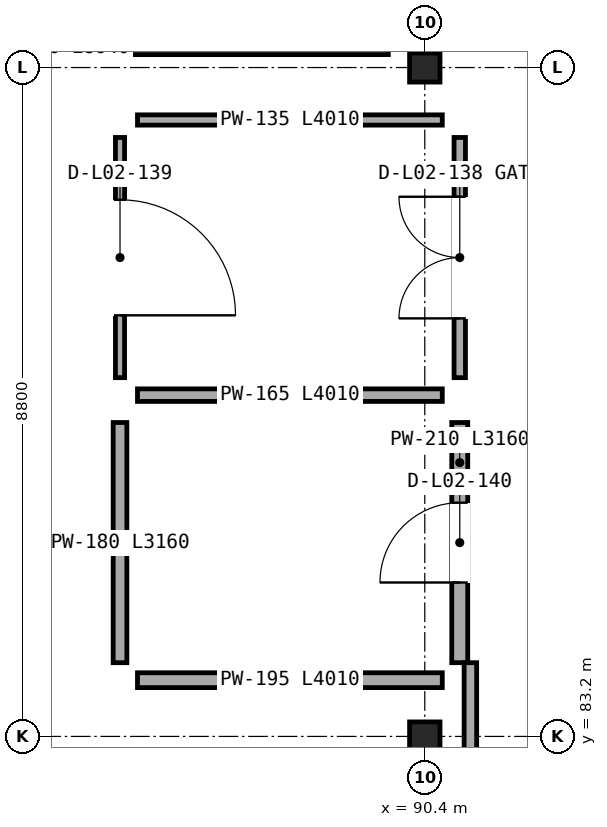
"""IFC4 building model, lengths in metres.
Left out: names, types, materials, properties, quantities, classifications, styles, units other than length and angle.
Written with IfcOpenShell. Run it as: python <this file> out.ifc"""

import sys

from ifc_helpers import new_model, si_unit, direction, frame, frame_2d, origin, origin_2d, place, context, subcontext, project, spatial, rectangle, i_section, extrude, element, fill, save


model = new_model("IFC4")
c1 = context("Model", 3, precision=1e-05, world=origin(), true_north=direction((0.0, 1.0)))
c2 = subcontext(c1, "Body", "Model", "MODEL_VIEW")
j1 = project(units=[si_unit("LENGTHUNIT", "METRE"), si_unit("PLANEANGLEUNIT", "RADIAN")], contexts=[c1])
p1 = place(None, origin())
s1 = spatial("IfcSite", under=j1, at=p1, CompositionType="ELEMENT")
p2 = place(p1, origin())
s2 = spatial("IfcBuilding", under=s1, at=p2, CompositionType="ELEMENT")
p3 = place(p2, frame((0.0, 0.0, 10.1)))
s3 = spatial("IfcBuildingStorey", under=s2, at=p3, CompositionType="ELEMENT", Elevation=10.1)
for number, where, z_axis, x_axis in (
    (1, (90.4, 83.2, 0.0), (0.0, 0.0, 1.0), (1.0, 0.0, 0.0)),
    (2, (90.4, 92.0, 0.0), (0.0, 0.0, 1.0), (1.0, 0.0, 0.0)),
):
    element("IfcColumn", number, at=place(p3, frame(where, z_axis=z_axis, x_axis=x_axis)), inside=s3, PredefinedType="COLUMN", context=c2, shape_type="SweptSolid", body=[
        extrude(i_section(OverallWidth=0.4, OverallDepth=0.382, WebThickness=0.025, FlangeThickness=0.036, at=origin_2d()), origin(), (0.0, 0.0, 1.0), 4.5),
    ])
p4 = place(p3, frame((90.63, 87.69, 0.0), z_axis=(0.0, 0.0, 1.0), x_axis=(-1.0, 0.0, 0.0)))
e3 = element("IfcWall", 3, at=p4, inside=s3, PredefinedType="PARTITIONING", context=c2, shape_type="SweptSolid", body=[
    extrude(rectangle(XDim=4.01, YDim=0.165, at=frame_2d((2.005, 0.0))), origin(), (0.0, 0.0, 1.0), 3.763),
])
p5 = place(p3, frame((90.86, 91.08, 0.0), z_axis=(0.0, 0.0, 1.0), x_axis=(0.0, -1.0, 0.0)))
e4 = element("IfcWall", 4, at=p5, inside=s3, PredefinedType="PARTITIONING", context=c2, shape_type="SweptSolid", body=[
    extrude(rectangle(XDim=3.16, YDim=0.15, at=frame_2d((1.58, 0.0))), origin(), (0.0, 0.0, 1.0), 4.13),
])
p6 = place(p5, frame((0.78, 0.0, 0.0)))
e5 = element("IfcOpeningElement", 5, at=p6, cuts=e4, PredefinedType="OPENING", context=c2, shape_type="SweptSolid", body=[
    extrude(rectangle(XDim=1.6, YDim=2.1, at=frame_2d((0.8, 1.05))), frame((0.0, 0.085, 0.0), z_axis=(0.0, -1.0, 0.0), x_axis=(1.0, 0.0, 0.0)), (0.0, 0.0, 1.0), 0.17),
])
p7 = place(p3, frame((86.62, 91.31, 0.0), z_axis=(0.0, 0.0, 1.0), x_axis=(1.0, 0.0, 0.0)))
e6 = element("IfcWall", 6, at=p7, inside=s3, PredefinedType="PARTITIONING", context=c2, shape_type="SweptSolid", body=[
    extrude(rectangle(XDim=4.01, YDim=0.135, at=frame_2d((2.005, 0.0))), origin(), (0.0, 0.0, 1.0), 3.763),
])
p8 = place(p3, frame((86.39, 87.92, 0.0), z_axis=(0.0, 0.0, 1.0), x_axis=(0.0, 1.0, 0.0)))
e7 = element("IfcWall", 7, at=p8, inside=s3, PredefinedType="PARTITIONING", context=c2, shape_type="SweptSolid", body=[
    extrude(rectangle(XDim=3.16, YDim=0.12, at=frame_2d((1.58, 0.0))), origin(), (0.0, 0.0, 1.0), 4.13),
])
p9 = place(p8, frame((0.82, 0.0, 0.0)))
e8 = element("IfcOpeningElement", 8, at=p9, cuts=e7, PredefinedType="OPENING", context=c2, shape_type="SweptSolid", body=[
    extrude(rectangle(XDim=1.52, YDim=2.34, at=frame_2d((0.76, 1.17))), frame((0.0, 0.07, 0.0), z_axis=(0.0, -1.0, 0.0), x_axis=(1.0, 0.0, 0.0)), (0.0, 0.0, 1.0), 0.14),
])
p10 = place(p3, frame((90.86, 87.33, 0.0), z_axis=(0.0, 0.0, 1.0), x_axis=(0.0, -1.0, 0.0)))
e9 = element("IfcWall", 9, at=p10, inside=s3, PredefinedType="PARTITIONING", context=c2, shape_type="SweptSolid", body=[
    extrude(rectangle(XDim=3.16, YDim=0.21, at=frame_2d((1.58, 0.0))), origin(), (0.0, 0.0, 1.0), 4.13),
])
p11 = place(p10, frame((1.055, 0.0, 0.0)))
e10 = element("IfcOpeningElement", 10, at=p11, cuts=e9, PredefinedType="OPENING", context=c2, shape_type="SweptSolid", body=[
    extrude(rectangle(XDim=1.05, YDim=2.15, at=frame_2d((0.525, 1.075))), frame((0.0, 0.115, 0.0), z_axis=(0.0, -1.0, 0.0), x_axis=(1.0, 0.0, 0.0)), (0.0, 0.0, 1.0), 0.23),
])
p12 = place(p3, frame((90.63, 83.94, 0.0), z_axis=(0.0, 0.0, 1.0), x_axis=(-1.0, 0.0, 0.0)))
e11 = element("IfcWall", 11, at=p12, inside=s3, PredefinedType="PARTITIONING", context=c2, shape_type="SweptSolid", body=[
    extrude(rectangle(XDim=4.01, YDim=0.195, at=frame_2d((2.005, 0.0))), origin(), (0.0, 0.0, 1.0), 3.763),
])
p13 = place(p3, frame((86.39, 84.17, 0.0), z_axis=(0.0, 0.0, 1.0), x_axis=(0.0, 1.0, 0.0)))
e12 = element("IfcWall", 12, at=p13, inside=s3, PredefinedType="PARTITIONING", context=c2, shape_type="SweptSolid", body=[
    extrude(rectangle(XDim=3.16, YDim=0.18, at=frame_2d((1.58, 0.0))), origin(), (0.0, 0.0, 1.0), 4.13),
])
p14 = place(p3, frame((81.28, 92.26, 0.0), z_axis=(0.0, 0.0, 1.0), x_axis=(1.0, 0.0, 0.0)))
e13 = element("IfcWall", 13, at=p14, inside=s3, PredefinedType="PARTITIONING", context=c2, shape_type="SweptSolid", body=[
    extrude(rectangle(XDim=8.64, YDim=0.18, at=frame_2d((4.32, 0.0))), origin(), (0.0, 0.0, 1.0), 3.613),
])
p15 = place(p3, frame((91.0, 84.17, 0.0), z_axis=(0.0, 0.0, 1.0), x_axis=(0.0, -1.0, 0.0)))
e14 = element("IfcWall", 14, at=p15, inside=s3, PredefinedType="PARTITIONING", context=c2, shape_type="SweptSolid", body=[
    extrude(rectangle(XDim=4.29, YDim=0.165, at=frame_2d((2.145, 0.0))), origin(), (0.0, 0.0, 1.0), 3.613),
])
p16 = place(p6, frame((1.6, 0.0, 0.0), z_axis=(0.0, 0.0, 1.0), x_axis=(-1.0, 0.0, 0.0)))
e15 = element("IfcDoor", 15, at=p16, inside=s3, OperationType="DOUBLE_DOOR_SINGLE_SWING", PredefinedType="GATE", context=c2, shape_type="SweptSolid", body=[
    extrude(rectangle(XDim=1.6, YDim=2.1, at=frame_2d((0.8, 1.05))), frame((0.0, 0.025, 0.0), z_axis=(0.0, -1.0, 0.0), x_axis=(1.0, 0.0, 0.0)), (0.0, 0.0, 1.0), 0.05),
])
fill(e5, e15)
p17 = place(p9, frame((1.52, 0.0, 0.0), z_axis=(0.0, 0.0, 1.0), x_axis=(-1.0, 0.0, 0.0)))
e16 = element("IfcDoor", 16, at=p17, inside=s3, OperationType="SINGLE_SWING_LEFT", PredefinedType="DOOR", context=c2, shape_type="SweptSolid", body=[
    extrude(rectangle(XDim=1.52, YDim=2.34, at=frame_2d((0.76, 1.17))), frame((0.0, 0.025, 0.0), z_axis=(0.0, -1.0, 0.0), x_axis=(1.0, 0.0, 0.0)), (0.0, 0.0, 1.0), 0.05),
])
fill(e8, e16)
p18 = place(p11, frame((1.05, 0.0, 0.0), z_axis=(0.0, 0.0, 1.0), x_axis=(-1.0, 0.0, 0.0)))
e17 = element("IfcDoor", 17, at=p18, inside=s3, OperationType="SINGLE_SWING_RIGHT", PredefinedType="DOOR", context=c2, shape_type="SweptSolid", body=[
    extrude(rectangle(XDim=1.05, YDim=2.15, at=frame_2d((0.525, 1.075))), frame((0.0, 0.025, 0.0), z_axis=(0.0, -1.0, 0.0), x_axis=(1.0, 0.0, 0.0)), (0.0, 0.0, 1.0), 0.05),
])
fill(e10, e17)
save(model, sys.argv[1])
